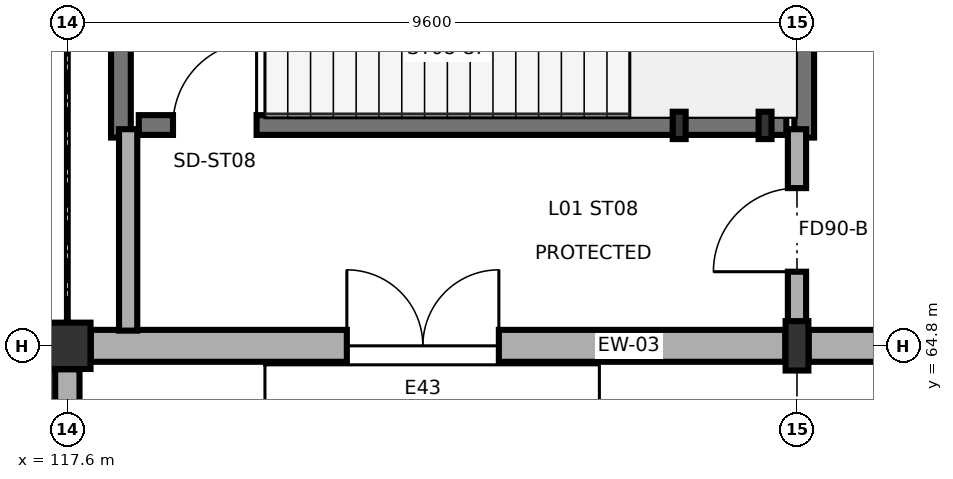
"""IFC4 building model, lengths in metres.
Left out: names, types, materials, properties, quantities, classifications, styles, units other than length and angle.
Written with IfcOpenShell. Run it as: python <this file> out.ifc"""

import sys

from ifc_helpers import new_model, si_unit, direction, frame, frame_2d, origin, origin_2d, place, context, subcontext, project, spatial, rectangle, hollow_circle, i_section, extrude, element, fill, save


model = new_model("IFC4")
c1 = context("Model", 3, precision=1e-05, world=origin(), true_north=direction((0.0, 1.0)))
c2 = subcontext(c1, "Body", "Model", "MODEL_VIEW")
j1 = project(units=[si_unit("LENGTHUNIT", "METRE"), si_unit("PLANEANGLEUNIT", "RADIAN")], contexts=[c1])
p1 = place(None, origin())
s1 = spatial("IfcSite", under=j1, at=p1, CompositionType="ELEMENT")
p2 = place(p1, origin())
s2 = spatial("IfcBuilding", under=s1, at=p2, CompositionType="ELEMENT")
p3 = place(p2, origin())
s3 = spatial("IfcBuildingStorey", under=s2, at=p3, CompositionType="ELEMENT", Elevation=0.0)
p4 = place(p3, frame((117.6, 64.8, 0.0), z_axis=(0.0, 0.0, 1.0), x_axis=(1.0, 0.0, 0.0)))
e1 = element("IfcColumn", 1, at=p4, inside=s3, PredefinedType="COLUMN", context=c2, shape_type="SweptSolid", body=[
    extrude(hollow_circle(Radius=0.305, WallThickness=0.025, at=origin_2d()), origin(), (0.0, 0.0, 1.0), 5.4),
])
p5 = place(p3, frame((127.2, 64.8, 0.0), z_axis=(0.0, 0.0, 1.0), x_axis=(1.0, 0.0, 0.0)))
e2 = element("IfcColumn", 2, at=p5, inside=s3, PredefinedType="COLUMN", context=c2, shape_type="SweptSolid", body=[
    extrude(i_section(OverallWidth=0.3, OverallDepth=0.65, WebThickness=0.016, FlangeThickness=0.031, FilletRadius=0.027, at=origin_2d()), origin(), (0.0, 0.0, 1.0), 5.4),
])
for number, where, z_axis, x_axis in (
    (3, (125.65, 67.7, 0.0), (0.0, 0.0, 1.0), (1.0, 0.0, 0.0)),
    (4, (126.78, 67.7, 0.0), (0.0, 0.0, 1.0), (1.0, 0.0, 0.0)),
):
    element("IfcColumn", number, at=place(p3, frame(where, z_axis=z_axis, x_axis=x_axis)), inside=s3, PredefinedType="PILASTER", context=c2, shape_type="SweptSolid", body=[
        extrude(i_section(OverallWidth=0.17, OverallDepth=0.36, WebThickness=0.008, FlangeThickness=0.013, FilletRadius=0.018, at=origin_2d()), origin(), (0.0, 0.0, 1.0), 5.4),
    ])
p6 = place(p3, frame((117.909, 64.8, 0.0), z_axis=(0.0, 0.0, 1.0), x_axis=(1.0, 0.0, 0.0)))
e5 = element("IfcWall", 5, at=p6, inside=s3, PredefinedType="SOLIDWALL", context=c2, shape_type="SweptSolid", body=[
    extrude(rectangle(XDim=9.137, YDim=0.42, at=frame_2d((4.568, 0.0))), origin(), (0.0, 0.0, 1.0), 4.685),
])
p7 = place(p6, frame((3.368, 0.0, 0.0)))
e6 = element("IfcOpeningElement", 6, at=p7, cuts=e5, PredefinedType="OPENING", context=c2, shape_type="SweptSolid", body=[
    extrude(rectangle(XDim=2.0, YDim=2.3, at=frame_2d((1.0, 1.15))), frame((0.0, 0.22, 0.0), z_axis=(0.0, -1.0, 0.0), x_axis=(1.0, 0.0, 0.0)), (0.0, 0.0, 1.0), 0.44),
])
p8 = place(p3, frame((127.354, 64.8, 0.0), z_axis=(0.0, 0.0, 1.0), x_axis=(1.0, 0.0, 0.0)))
e7 = element("IfcWall", 7, at=p8, inside=s3, PredefinedType="SOLIDWALL", context=c2, shape_type="SweptSolid", body=[
    extrude(rectangle(XDim=9.292, YDim=0.42, at=frame_2d((4.646, 0.0))), origin(), (0.0, 0.0, 1.0), 4.685),
])
p9 = place(p8, frame((3.446, 0.0, 0.0)))
e8 = element("IfcOpeningElement", 8, at=p9, cuts=e7, PredefinedType="OPENING", context=c2, shape_type="SweptSolid", body=[
    extrude(rectangle(XDim=2.0, YDim=2.3, at=frame_2d((1.0, 1.15))), frame((0.0, 0.22, 0.0), z_axis=(0.0, -1.0, 0.0), x_axis=(1.0, 0.0, 0.0)), (0.0, 0.0, 1.0), 0.44),
])
p10 = place(p3, frame((117.6, 55.454, 0.0), z_axis=(0.0, 0.0, 1.0), x_axis=(0.0, 1.0, 0.0)))
e9 = element("IfcWall", 9, at=p10, inside=s3, PredefinedType="SOLIDWALL", context=c2, shape_type="SweptSolid", body=[
    extrude(rectangle(XDim=9.037, YDim=0.32, at=frame_2d((4.519, 0.0))), origin(), (0.0, 0.0, 1.0), 4.625),
])
p11 = place(p10, frame((2.084, 0.0, 0.75)))
e10 = element("IfcOpeningElement", 10, at=p11, cuts=e9, PredefinedType="OPENING", context=c2, shape_type="SweptSolid", body=[
    extrude(rectangle(XDim=1.5, YDim=1.4, at=frame_2d((0.75, 0.7))), frame((0.0, 0.17, 0.0), z_axis=(0.0, -1.0, 0.0), x_axis=(1.0, 0.0, 0.0)), (0.0, 0.0, 1.0), 0.34),
])
p12 = place(p10, frame((5.453, 0.0, 0.75)))
e11 = element("IfcOpeningElement", 11, at=p12, cuts=e9, PredefinedType="OPENING", context=c2, shape_type="SweptSolid", body=[
    extrude(rectangle(XDim=1.5, YDim=1.4, at=frame_2d((0.75, 0.7))), frame((0.0, 0.17, 0.0), z_axis=(0.0, -1.0, 0.0), x_axis=(1.0, 0.0, 0.0)), (0.0, 0.0, 1.0), 0.34),
])
for number, where, z_axis, x_axis in (
    (12, (118.305, 67.54, 0.0), (0.0, 0.0, 1.0), (0.0, 1.0, 0.0)),
    (13, (127.295, 67.54, 0.0), (0.0, 0.0, 1.0), (0.0, 1.0, 0.0)),
):
    element("IfcWall", number, at=place(p3, frame(where, z_axis=z_axis, x_axis=x_axis)), inside=s3, PredefinedType="SHEAR", context=c2, shape_type="SweptSolid", body=[
        extrude(rectangle(XDim=4.27, YDim=0.26, at=frame_2d((2.135, 0.0))), origin(), (0.0, 0.0, 1.0), 5.14),
    ])
p13 = place(p3, frame((118.54, 67.705, 0.0), z_axis=(0.0, 0.0, 1.0), x_axis=(1.0, 0.0, 0.0)))
e14 = element("IfcWall", 14, at=p13, inside=s3, PredefinedType="SHEAR", context=c2, shape_type="SweptSolid", body=[
    extrude(rectangle(XDim=8.52, YDim=0.26, at=frame_2d((4.26, 0.0))), origin(), (0.0, 0.0, 1.0), 5.14),
])
p14 = place(p13, frame((0.45, 0.0, 0.0)))
e15 = element("IfcOpeningElement", 15, at=p14, cuts=e14, PredefinedType="OPENING", context=c2, shape_type="SweptSolid", body=[
    extrude(rectangle(XDim=1.1, YDim=2.2, at=frame_2d((0.55, 1.1))), frame((0.0, 0.14, 0.0), z_axis=(0.0, -1.0, 0.0), x_axis=(1.0, 0.0, 0.0)), (0.0, 0.0, 1.0), 0.28),
])
p15 = place(p3, frame((118.4, 65.0, 0.0), z_axis=(0.0, 0.0, 1.0), x_axis=(0.0, 1.0, 0.0)))
e16 = element("IfcWall", 16, at=p15, inside=s3, PredefinedType="SOLIDWALL", context=c2, shape_type="SweptSolid", body=[
    extrude(rectangle(XDim=2.65, YDim=0.24, at=frame_2d((1.325, 0.0))), origin(), (0.0, 0.0, 1.0), 5.14),
])
p16 = place(p3, frame((127.2, 65.0, 0.0), z_axis=(0.0, 0.0, 1.0), x_axis=(0.0, 1.0, 0.0)))
e17 = element("IfcWall", 17, at=p16, inside=s3, PredefinedType="SOLIDWALL", context=c2, shape_type="SweptSolid", body=[
    extrude(rectangle(XDim=2.65, YDim=0.24, at=frame_2d((1.325, 0.0))), origin(), (0.0, 0.0, 1.0), 5.14),
])
p17 = place(p16, frame((0.775, 0.0, 0.0)))
e18 = element("IfcOpeningElement", 18, at=p17, cuts=e17, PredefinedType="OPENING", context=c2, shape_type="SweptSolid", body=[
    extrude(rectangle(XDim=1.1, YDim=2.2, at=frame_2d((0.55, 1.1))), frame((0.0, 0.13, 0.0), z_axis=(0.0, -1.0, 0.0), x_axis=(1.0, 0.0, 0.0)), (0.0, 0.0, 1.0), 0.26),
])
p18 = place(p7, frame((2.0, 0.0, 0.0), z_axis=(0.0, 0.0, 1.0), x_axis=(-1.0, 0.0, 0.0)))
e19 = element("IfcDoor", 19, at=p18, inside=s3, OperationType="DOUBLE_DOOR_SINGLE_SWING", PredefinedType="DOOR", context=c2, shape_type="SweptSolid", body=[
    extrude(rectangle(XDim=2.0, YDim=2.3, at=frame_2d((1.0, 1.15))), frame((0.0, 0.025, 0.0), z_axis=(0.0, -1.0, 0.0), x_axis=(1.0, 0.0, 0.0)), (0.0, 0.0, 1.0), 0.05),
])
fill(e6, e19)
p19 = place(p14, origin())
e20 = element("IfcDoor", 20, at=p19, inside=s3, OperationType="SINGLE_SWING_RIGHT", PredefinedType="DOOR", context=c2, shape_type="SweptSolid", body=[
    extrude(rectangle(XDim=1.1, YDim=2.2, at=frame_2d((0.55, 1.1))), frame((0.0, 0.025, 0.0), z_axis=(0.0, -1.0, 0.0), x_axis=(1.0, 0.0, 0.0)), (0.0, 0.0, 1.0), 0.05),
])
fill(e15, e20)
p20 = place(p17, origin())
e21 = element("IfcDoor", 21, at=p20, inside=s3, OperationType="SINGLE_SWING_LEFT", PredefinedType="DOOR", context=c2, shape_type="SweptSolid", body=[
    extrude(rectangle(XDim=1.1, YDim=2.2, at=frame_2d((0.55, 1.1))), frame((0.0, 0.025, 0.0), z_axis=(0.0, -1.0, 0.0), x_axis=(1.0, 0.0, 0.0)), (0.0, 0.0, 1.0), 0.05),
])
fill(e18, e21)
save(model, sys.argv[1])
